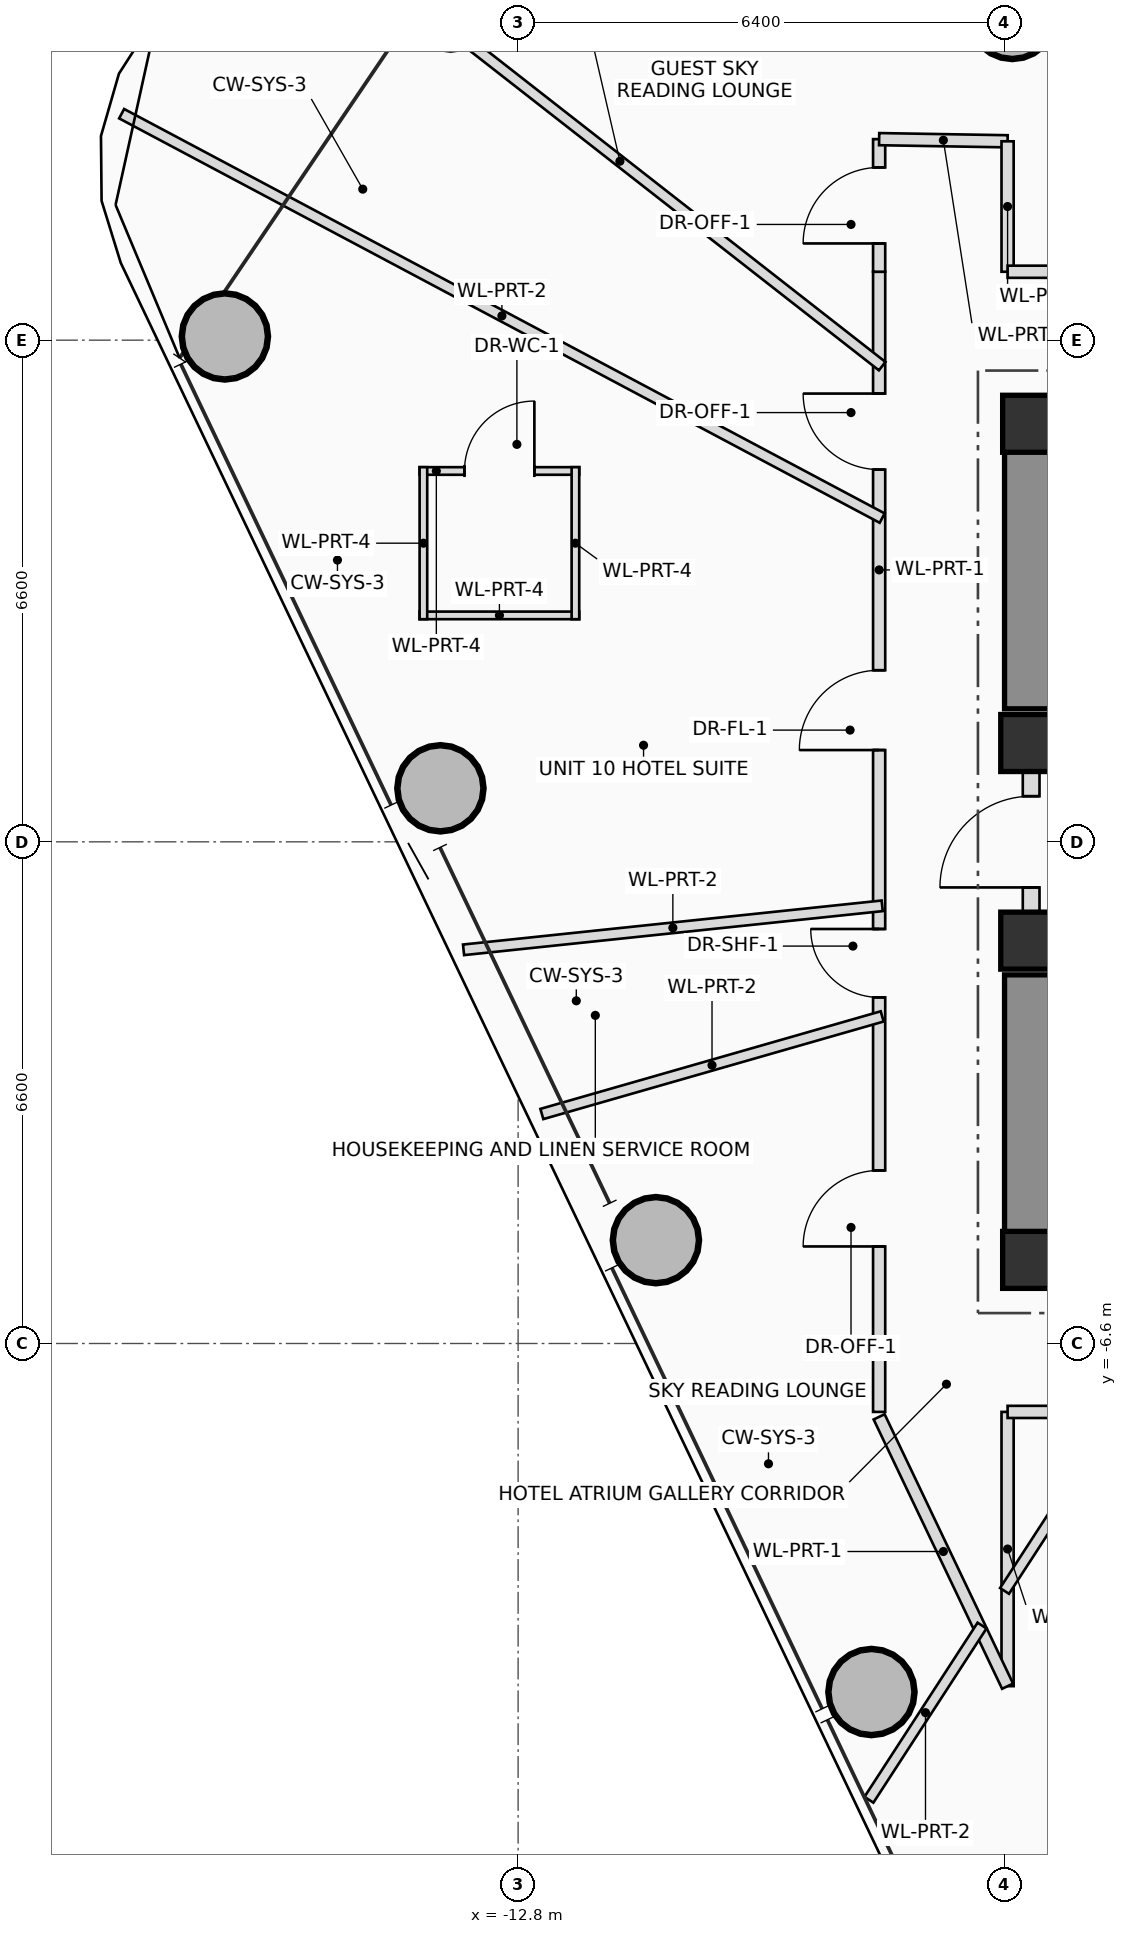
"""IFC4 building model, lengths in metres.
Left out: names, types, materials, properties, quantities, classifications, styles, units other than length and angle.
Written with IfcOpenShell. Run it as: python <this file> out.ifc"""

import sys

from ifc_helpers import new_model, si_unit, direction, frame, frame_2d, origin, origin_2d, place, context, subcontext, project, spatial, rectangle, hollow_circle, extrude, source, transform, mapped, element, fill, save


model = new_model("IFC4")
c1 = context("Model", 3, precision=1e-05, world=origin(), true_north=direction((0.0, 1.0)))
c2 = subcontext(c1, "Body", "Model", "MODEL_VIEW")
j1 = project(units=[si_unit("LENGTHUNIT", "METRE"), si_unit("PLANEANGLEUNIT", "RADIAN")], contexts=[c1])
p1 = place(None, origin())
s1 = spatial("IfcSite", under=j1, at=p1, CompositionType="ELEMENT")
p2 = place(p1, origin())
s2 = spatial("IfcBuilding", under=s1, at=p2, CompositionType="ELEMENT")
p3 = place(p2, frame((0.0, 0.0, 191.45)))
s3 = spatial("IfcBuildingStorey", under=s2, at=p3, CompositionType="ELEMENT", Elevation=191.45)
m1 = source(origin(), c2, "Body", "SweptSolid", [
    extrude(rectangle(XDim=0.75, YDim=0.75, at=origin_2d()), origin(), (0.0, 0.0, 1.0), 3.45),
])
for number, where, z_axis, x_axis in (
    (1, (-6.05, -5.5, 0.0), (0.0, 0.0, 1.0), (1.0, 0.0, 0.0)),
    (2, (-6.05, 5.5, 0.0), (0.0, 0.0, 1.0), (1.0, 0.0, 0.0)),
):
    element("IfcColumn", number, at=place(p3, frame(where, z_axis=z_axis, x_axis=x_axis)), inside=s3, PredefinedType="COLUMN", context=c2, shape_type="MappedRepresentation", body=[
        mapped(m1, transform((0.0, 0.0, 0.0), scale=1.0)),
    ])
p4 = place(p3, frame((-6.4, 5.525, 0.0), z_axis=(0.0, 0.0, 1.0), x_axis=(1.0, 0.0, 0.0)))
e3 = element("IfcWall", 3, at=p4, inside=s3, PredefinedType="SHEAR", context=c2, shape_type="SweptSolid", body=[
    extrude(rectangle(XDim=12.8, YDim=0.65, at=frame_2d((6.4, 0.0))), origin(), (0.0, 0.0, 1.0), 3.45),
])
p5 = place(p4, frame((8.6, 0.0, 0.0)))
e4 = element("IfcOpeningElement", 4, at=p5, cuts=e3, PredefinedType="OPENING", context=c2, shape_type="SweptSolid", body=[
    extrude(rectangle(XDim=1.2, YDim=2.2, at=frame_2d((0.6, 1.1))), frame((0.0, 0.335, 0.0), z_axis=(0.0, -1.0, 0.0), x_axis=(1.0, 0.0, 0.0)), (0.0, 0.0, 1.0), 0.67),
])
p6 = place(p3, frame((-6.4, -5.525, 0.0), z_axis=(0.0, 0.0, 1.0), x_axis=(1.0, 0.0, 0.0)))
e5 = element("IfcWall", 5, at=p6, inside=s3, PredefinedType="SHEAR", context=c2, shape_type="SweptSolid", body=[
    extrude(rectangle(XDim=12.8, YDim=0.65, at=frame_2d((6.4, 0.0))), origin(), (0.0, 0.0, 1.0), 3.45),
])
p7 = place(p6, frame((8.6, 0.0, 0.0)))
e6 = element("IfcOpeningElement", 6, at=p7, cuts=e5, PredefinedType="OPENING", context=c2, shape_type="SweptSolid", body=[
    extrude(rectangle(XDim=1.2, YDim=2.2, at=frame_2d((0.6, 1.1))), frame((0.0, 0.335, 0.0), z_axis=(0.0, -1.0, 0.0), x_axis=(1.0, 0.0, 0.0)), (0.0, 0.0, 1.0), 0.67),
])
for number, where, z_axis, x_axis in (
    (7, (-6.075, -5.2, 0.0), (0.0, 0.0, 1.0), (0.0, 1.0, 0.0)),
    (8, (-6.075, 1.75, 0.0), (0.0, 0.0, 1.0), (0.0, 1.0, 0.0)),
):
    element("IfcWall", number, at=place(p3, frame(where, z_axis=z_axis, x_axis=x_axis)), inside=s3, PredefinedType="SHEAR", context=c2, shape_type="SweptSolid", body=[
        extrude(rectangle(XDim=3.45, YDim=0.65, at=frame_2d((1.725, 0.0))), origin(), (0.0, 0.0, 1.0), 3.45),
    ])
for number, where, z_axis, x_axis in (
    (9, (-6.075, -1.3, 0.0), (0.0, 0.0, 1.0), (1.0, 0.0, 0.0)),
    (10, (-6.075, 1.3, 0.0), (0.0, 0.0, 1.0), (1.0, 0.0, 0.0)),
):
    element("IfcColumn", number, at=place(p3, frame(where, z_axis=z_axis, x_axis=x_axis)), inside=s3, PredefinedType="COLUMN", context=c2, shape_type="MappedRepresentation", body=[
        mapped(m1, transform((0.0, 0.0, 0.0), scale=1.0)),
    ])
m2 = source(origin(), c2, "Body", "SweptSolid", [
    extrude(hollow_circle(Radius=0.575, WallThickness=0.042, at=origin_2d()), origin(), (0.0, 0.0, 1.0), 3.45),
])
for number, where, z_axis, x_axis in (
    (11, (-6.298, 10.865, 0.0), (0.0, 0.0, 1.0), (1.0, 0.0, 0.0)),
    (12, (-16.658, 6.649, 0.0), (0.0, 0.0, 1.0), (1.0, 0.0, 0.0)),
    (13, (-13.823, 0.704, 0.0), (0.0, 0.0, 1.0), (1.0, 0.0, 0.0)),
    (14, (-10.987, -5.24, 0.0), (0.0, 0.0, 1.0), (1.0, 0.0, 0.0)),
    (15, (-8.151, -11.185, 0.0), (0.0, 0.0, 1.0), (1.0, 0.0, 0.0)),
):
    element("IfcColumn", number, at=place(p3, frame(where, z_axis=z_axis, x_axis=x_axis)), inside=s3, PredefinedType="COLUMN", context=c2, shape_type="MappedRepresentation", body=[
        mapped(m2, transform((0.0, 0.0, 0.0), scale=1.0)),
    ])
p8 = place(p3, frame((-6.05, -0.95, 0.0), z_axis=(0.0, 0.0, 1.0), x_axis=(0.0, 1.0, 0.0)))
e16 = element("IfcWall", 16, at=p8, inside=s3, PredefinedType="PLUMBINGWALL", context=c2, shape_type="SweptSolid", body=[
    extrude(rectangle(XDim=1.9, YDim=0.22, at=frame_2d((0.95, 0.0))), origin(), (0.0, 0.0, 1.0), 2.23),
])
p9 = place(p8, frame((0.35, 0.0, 0.0)))
e17 = element("IfcOpeningElement", 17, at=p9, cuts=e16, PredefinedType="OPENING", context=c2, shape_type="SweptSolid", body=[
    extrude(rectangle(XDim=1.2, YDim=2.2, at=frame_2d((0.6, 1.1))), frame((0.0, 0.12, 0.0), z_axis=(0.0, -1.0, 0.0), x_axis=(1.0, 0.0, 0.0)), (0.0, 0.0, 1.0), 0.24),
])
p10 = place(p3, frame((-14.096, 4.879, 0.0), z_axis=(0.0, 0.0, 1.0), x_axis=(1.0, 0.0, 0.0)))
e18 = element("IfcWall", 18, at=p10, inside=s3, PredefinedType="PARTITIONING", context=c2, shape_type="SweptSolid", body=[
    extrude(rectangle(XDim=2.1, YDim=0.1, at=frame_2d((1.05, 0.0))), origin(), (0.0, 0.0, 1.0), 2.905),
])
p11 = place(p10, frame((0.59, 0.0, 0.0)))
e19 = element("IfcOpeningElement", 19, at=p11, cuts=e18, PredefinedType="OPENING", context=c2, shape_type="SweptSolid", body=[
    extrude(rectangle(XDim=0.92, YDim=2.1, at=frame_2d((0.46, 1.05))), frame((0.0, 0.06, 0.0), z_axis=(0.0, -1.0, 0.0), x_axis=(1.0, 0.0, 0.0)), (0.0, 0.0, 1.0), 0.12),
])
p12 = place(p3, frame((-11.996, 2.979, 0.0), z_axis=(0.0, 0.0, 1.0), x_axis=(-1.0, 0.0, 0.0)))
e20 = element("IfcWall", 20, at=p12, inside=s3, PredefinedType="PARTITIONING", context=c2, shape_type="SweptSolid", body=[
    extrude(rectangle(XDim=2.1, YDim=0.1, at=frame_2d((1.05, 0.0))), origin(), (0.0, 0.0, 1.0), 2.905),
])
for number, where, z_axis, x_axis in (
    (21, (-12.046, 4.929, 0.0), (0.0, 0.0, 1.0), (0.0, -1.0, 0.0)),
    (22, (-14.046, 2.929, 0.0), (0.0, 0.0, 1.0), (0.0, 1.0, 0.0)),
):
    element("IfcWall", number, at=place(p3, frame(where, z_axis=z_axis, x_axis=x_axis)), inside=s3, PredefinedType="PARTITIONING", context=c2, shape_type="SweptSolid", body=[
        extrude(rectangle(XDim=2.0, YDim=0.1, at=frame_2d((1.0, 0.0))), origin(), (0.0, 0.0, 1.0), 3.25),
    ])
p13 = place(p3, frame((-6.36, -7.5, 0.0), z_axis=(0.0, 0.0, 1.0), x_axis=(0.0, -1.0, 0.0)))
e23 = element("IfcWall", 23, at=p13, inside=s3, PredefinedType="PARTITIONING", context=c2, shape_type="SweptSolid", body=[
    extrude(rectangle(XDim=3.608, YDim=0.16, at=frame_2d((1.804, 0.0))), origin(), (0.0, 0.0, 1.0), 3.25),
])
p14 = place(p3, frame((-6.36, -11.108, 0.0), z_axis=(0.0, 0.0, 1.0), x_axis=(-0.430493571255, 0.902593643401, 0.0)))
e24 = element("IfcWall", 24, at=p14, inside=s3, PredefinedType="PARTITIONING", context=c2, shape_type="SweptSolid", body=[
    extrude(rectangle(XDim=3.926, YDim=0.16, at=frame_2d((1.963, 0.0))), origin(), (0.0, 0.0, 1.0), 2.605),
])
p15 = place(p3, frame((-8.05, -7.5, 0.0), z_axis=(0.0, 0.0, 1.0), x_axis=(0.0, 1.0, 0.0)))
e25 = element("IfcWall", 25, at=p15, inside=s3, PredefinedType="PARTITIONING", context=c2, shape_type="SweptSolid", body=[
    extrude(rectangle(XDim=15.0, YDim=0.16, at=frame_2d((7.5, 0.0))), origin(), (0.0, 0.0, 1.0), 2.605),
])
p16 = place(p15, frame((2.177, 0.0, 0.0)))
e26 = element("IfcOpeningElement", 26, at=p16, cuts=e25, PredefinedType="OPENING", context=c2, shape_type="SweptSolid", body=[
    extrude(rectangle(XDim=1.0, YDim=2.25, at=frame_2d((0.5, 1.125))), frame((0.0, 0.09, 0.0), z_axis=(0.0, -1.0, 0.0), x_axis=(1.0, 0.0, 0.0)), (0.0, 0.0, 1.0), 0.18),
])
p17 = place(p15, frame((5.453, 0.0, 0.0)))
e27 = element("IfcOpeningElement", 27, at=p17, cuts=e25, PredefinedType="OPENING", context=c2, shape_type="SweptSolid", body=[
    extrude(rectangle(XDim=0.9, YDim=2.05, at=frame_2d((0.45, 1.025))), frame((0.0, 0.09, 0.0), z_axis=(0.0, -1.0, 0.0), x_axis=(1.0, 0.0, 0.0)), (0.0, 0.0, 1.0), 0.18),
])
p18 = place(p15, frame((8.707, 0.0, 0.0)))
e28 = element("IfcOpeningElement", 28, at=p18, cuts=e25, PredefinedType="OPENING", context=c2, shape_type="SweptSolid", body=[
    extrude(rectangle(XDim=1.05, YDim=2.2, at=frame_2d((0.525, 1.1))), frame((0.0, 0.09, 0.0), z_axis=(0.0, -1.0, 0.0), x_axis=(1.0, 0.0, 0.0)), (0.0, 0.0, 1.0), 0.18),
])
p19 = place(p15, frame((12.397, 0.0, 0.0)))
e29 = element("IfcOpeningElement", 29, at=p19, cuts=e25, PredefinedType="OPENING", context=c2, shape_type="SweptSolid", body=[
    extrude(rectangle(XDim=1.0, YDim=2.25, at=frame_2d((0.5, 1.125))), frame((0.0, 0.09, 0.0), z_axis=(0.0, -1.0, 0.0), x_axis=(1.0, 0.0, 0.0)), (0.0, 0.0, 1.0), 0.18),
])
p20 = place(p3, frame((-8.05, 7.5, 0.0), z_axis=(0.0, 0.0, 1.0), x_axis=(0.0, 1.0, 0.0)))
e30 = element("IfcWall", 30, at=p20, inside=s3, PredefinedType="PARTITIONING", context=c2, shape_type="SweptSolid", body=[
    extrude(rectangle(XDim=1.745, YDim=0.16, at=frame_2d((0.872, 0.0))), origin(), (0.0, 0.0, 1.0), 2.805),
])
p21 = place(p20, frame((0.372, 0.0, 0.0)))
e31 = element("IfcOpeningElement", 31, at=p21, cuts=e30, PredefinedType="OPENING", context=c2, shape_type="SweptSolid", body=[
    extrude(rectangle(XDim=1.0, YDim=2.25, at=frame_2d((0.5, 1.125))), frame((0.0, 0.09, 0.0), z_axis=(0.0, -1.0, 0.0), x_axis=(1.0, 0.0, 0.0)), (0.0, 0.0, 1.0), 0.18),
])
p22 = place(p3, frame((-8.05, 9.245, 0.0), z_axis=(0.0, 0.0, 1.0), x_axis=(0.999859611566, -0.016755809729, 0.0)))
e32 = element("IfcWall", 32, at=p22, inside=s3, PredefinedType="PARTITIONING", context=c2, shape_type="SweptSolid", body=[
    extrude(rectangle(XDim=1.69, YDim=0.16, at=frame_2d((0.845, 0.0))), origin(), (0.0, 0.0, 1.0), 2.905),
])
p23 = place(p3, frame((-6.36, 9.216, 0.0), z_axis=(0.0, 0.0, 1.0), x_axis=(0.0, -1.0, 0.0)))
e33 = element("IfcWall", 33, at=p23, inside=s3, PredefinedType="PARTITIONING", context=c2, shape_type="SweptSolid", body=[
    extrude(rectangle(XDim=1.716, YDim=0.16, at=frame_2d((0.858, 0.0))), origin(), (0.0, 0.0, 1.0), 2.605),
])
p24 = place(p3, frame((-6.36, 7.5, 0.0), z_axis=(0.0, 0.0, 1.0), x_axis=(1.0, 0.0, 0.0)))
e34 = element("IfcWall", 34, at=p24, inside=s3, PredefinedType="PARTITIONING", context=c2, shape_type="SweptSolid", body=[
    extrude(rectangle(XDim=11.61, YDim=0.16, at=frame_2d((5.805, 0.0))), origin(), (0.0, 0.0, 1.0), 2.605),
])
p25 = place(p24, frame((3.948, 0.0, 0.0)))
e35 = element("IfcOpeningElement", 35, at=p25, cuts=e34, PredefinedType="OPENING", context=c2, shape_type="SweptSolid", body=[
    extrude(rectangle(XDim=1.0, YDim=2.25, at=frame_2d((0.5, 1.125))), frame((0.0, 0.09, 0.0), z_axis=(0.0, -1.0, 0.0), x_axis=(1.0, 0.0, 0.0)), (0.0, 0.0, 1.0), 0.18),
])
p26 = place(p24, frame((8.993, 0.0, 0.0)))
e36 = element("IfcOpeningElement", 36, at=p26, cuts=e34, PredefinedType="OPENING", context=c2, shape_type="SweptSolid", body=[
    extrude(rectangle(XDim=1.0, YDim=2.25, at=frame_2d((0.5, 1.125))), frame((0.0, 0.09, 0.0), z_axis=(0.0, -1.0, 0.0), x_axis=(1.0, 0.0, 0.0)), (0.0, 0.0, 1.0), 0.18),
])
p27 = place(p3, frame((5.25, -7.5, 0.0), z_axis=(0.0, 0.0, 1.0), x_axis=(-1.0, 0.0, 0.0)))
e37 = element("IfcWall", 37, at=p27, inside=s3, PredefinedType="PARTITIONING", context=c2, shape_type="SweptSolid", body=[
    extrude(rectangle(XDim=11.61, YDim=0.16, at=frame_2d((5.805, 0.0))), origin(), (0.0, 0.0, 1.0), 2.605),
])
p28 = place(p27, frame((1.525, 0.0, 0.0)))
e38 = element("IfcOpeningElement", 38, at=p28, cuts=e37, PredefinedType="OPENING", context=c2, shape_type="SweptSolid", body=[
    extrude(rectangle(XDim=1.05, YDim=2.2, at=frame_2d((0.525, 1.1))), frame((0.0, 0.09, 0.0), z_axis=(0.0, -1.0, 0.0), x_axis=(1.0, 0.0, 0.0)), (0.0, 0.0, 1.0), 0.18),
])
p29 = place(p27, frame((4.281, 0.0, 0.0)))
e39 = element("IfcOpeningElement", 39, at=p29, cuts=e37, PredefinedType="OPENING", context=c2, shape_type="SweptSolid", body=[
    extrude(rectangle(XDim=1.0, YDim=2.25, at=frame_2d((0.5, 1.125))), frame((0.0, 0.09, 0.0), z_axis=(0.0, -1.0, 0.0), x_axis=(1.0, 0.0, 0.0)), (0.0, 0.0, 1.0), 0.18),
])
p30 = place(p27, frame((7.409, 0.0, 0.0)))
e40 = element("IfcOpeningElement", 40, at=p30, cuts=e37, PredefinedType="OPENING", context=c2, shape_type="SweptSolid", body=[
    extrude(rectangle(XDim=1.0, YDim=2.25, at=frame_2d((0.5, 1.125))), frame((0.0, 0.09, 0.0), z_axis=(0.0, -1.0, 0.0), x_axis=(1.0, 0.0, 0.0)), (0.0, 0.0, 1.0), 0.18),
])
p31 = place(p3, frame((-8.01, 6.258, 0.0), z_axis=(0.0, 0.0, 1.0), x_axis=(-0.788015921071, 0.615654861216, 0.0)))
e41 = element("IfcWall", 41, at=p31, inside=s3, PredefinedType="PARTITIONING", context=c2, shape_type="SweptSolid", body=[
    extrude(rectangle(XDim=8.758, YDim=0.14, at=frame_2d((4.379, 0.0))), origin(), (0.0, 0.0, 1.0), 2.805),
])
p32 = place(p3, frame((-8.01, 4.259, 0.0), z_axis=(0.0, 0.0, 1.0), x_axis=(-0.882949150857, 0.469468632606, 0.0)))
e42 = element("IfcWall", 42, at=p32, inside=s3, PredefinedType="PARTITIONING", context=c2, shape_type="SweptSolid", body=[
    extrude(rectangle(XDim=11.333, YDim=0.14, at=frame_2d((5.667, 0.0))), origin(), (0.0, 0.0, 1.0), 2.605),
])
p33 = place(p3, frame((-8.01, -0.842, 0.0), z_axis=(0.0, 0.0, 1.0), x_axis=(-0.994518006468, -0.104565457063, 0.0)))
e43 = element("IfcWall", 43, at=p33, inside=s3, PredefinedType="PARTITIONING", context=c2, shape_type="SweptSolid", body=[
    extrude(rectangle(XDim=5.538, YDim=0.14, at=frame_2d((2.769, 0.0))), origin(), (0.0, 0.0, 1.0), 2.765),
])
p34 = place(p3, frame((-8.01, -2.297, 0.0), z_axis=(0.0, 0.0, 1.0), x_axis=(-0.961260451266, -0.275641696467, 0.0)))
e44 = element("IfcWall", 44, at=p34, inside=s3, PredefinedType="PARTITIONING", context=c2, shape_type="SweptSolid", body=[
    extrude(rectangle(XDim=4.658, YDim=0.14, at=frame_2d((2.329, 0.0))), origin(), (0.0, 0.0, 1.0), 2.765),
])
p35 = place(p3, frame((-4.844, -7.46, 0.0), z_axis=(0.0, 0.0, 1.0), x_axis=(-0.544657766351, -0.838658403376, 0.0)))
e45 = element("IfcWall", 45, at=p35, inside=s3, PredefinedType="PARTITIONING", context=c2, shape_type="SweptSolid", body=[
    extrude(rectangle(XDim=2.856, YDim=0.14, at=frame_2d((1.428, 0.0))), origin(), (0.0, 0.0, 1.0), 2.605),
])
p36 = place(p3, frame((-6.696, -10.311, 0.0), z_axis=(0.0, 0.0, 1.0), x_axis=(-0.54459891399, -0.838696621479, 0.0)))
e46 = element("IfcWall", 46, at=p36, inside=s3, PredefinedType="PARTITIONING", context=c2, shape_type="SweptSolid", body=[
    extrude(rectangle(XDim=2.733, YDim=0.14, at=frame_2d((1.366, 0.0))), origin(), (0.0, 0.0, 1.0), 2.765),
])
p37 = place(p9, origin())
e47 = element("IfcDoor", 47, at=p37, inside=s3, OperationType="SINGLE_SWING_LEFT", PredefinedType="DOOR", context=c2, shape_type="SweptSolid", body=[
    extrude(rectangle(XDim=1.2, YDim=2.2, at=frame_2d((0.6, 1.1))), frame((0.0, 0.025, 0.0), z_axis=(0.0, -1.0, 0.0), x_axis=(1.0, 0.0, 0.0)), (0.0, 0.0, 1.0), 0.05),
])
fill(e17, e47)
p38 = place(p11, origin())
e48 = element("IfcDoor", 48, at=p38, inside=s3, OperationType="SINGLE_SWING_RIGHT", PredefinedType="DOOR", context=c2, shape_type="SweptSolid", body=[
    extrude(rectangle(XDim=0.92, YDim=2.1, at=frame_2d((0.46, 1.05))), frame((0.0, 0.025, 0.0), z_axis=(0.0, -1.0, 0.0), x_axis=(1.0, 0.0, 0.0)), (0.0, 0.0, 1.0), 0.05),
])
fill(e19, e48)
p39 = place(p16, origin())
e49 = element("IfcDoor", 49, at=p39, inside=s3, OperationType="SINGLE_SWING_LEFT", PredefinedType="DOOR", context=c2, shape_type="SweptSolid", body=[
    extrude(rectangle(XDim=1.0, YDim=2.25, at=frame_2d((0.5, 1.125))), frame((0.0, 0.025, 0.0), z_axis=(0.0, -1.0, 0.0), x_axis=(1.0, 0.0, 0.0)), (0.0, 0.0, 1.0), 0.05),
])
fill(e26, e49)
p40 = place(p17, origin())
e50 = element("IfcDoor", 50, at=p40, inside=s3, OperationType="SINGLE_SWING_RIGHT", PredefinedType="DOOR", context=c2, shape_type="SweptSolid", body=[
    extrude(rectangle(XDim=0.9, YDim=2.05, at=frame_2d((0.45, 1.025))), frame((0.0, 0.025, 0.0), z_axis=(0.0, -1.0, 0.0), x_axis=(1.0, 0.0, 0.0)), (0.0, 0.0, 1.0), 0.05),
])
fill(e27, e50)
p41 = place(p18, origin())
e51 = element("IfcDoor", 51, at=p41, inside=s3, OperationType="SINGLE_SWING_LEFT", PredefinedType="DOOR", context=c2, shape_type="SweptSolid", body=[
    extrude(rectangle(XDim=1.05, YDim=2.2, at=frame_2d((0.525, 1.1))), frame((0.0, 0.025, 0.0), z_axis=(0.0, -1.0, 0.0), x_axis=(1.0, 0.0, 0.0)), (0.0, 0.0, 1.0), 0.05),
])
fill(e28, e51)
p42 = place(p19, origin())
e52 = element("IfcDoor", 52, at=p42, inside=s3, OperationType="SINGLE_SWING_RIGHT", PredefinedType="DOOR", context=c2, shape_type="SweptSolid", body=[
    extrude(rectangle(XDim=1.0, YDim=2.25, at=frame_2d((0.5, 1.125))), frame((0.0, 0.025, 0.0), z_axis=(0.0, -1.0, 0.0), x_axis=(1.0, 0.0, 0.0)), (0.0, 0.0, 1.0), 0.05),
])
fill(e29, e52)
p43 = place(p21, origin())
e53 = element("IfcDoor", 53, at=p43, inside=s3, OperationType="SINGLE_SWING_LEFT", PredefinedType="DOOR", context=c2, shape_type="SweptSolid", body=[
    extrude(rectangle(XDim=1.0, YDim=2.25, at=frame_2d((0.5, 1.125))), frame((0.0, 0.025, 0.0), z_axis=(0.0, -1.0, 0.0), x_axis=(1.0, 0.0, 0.0)), (0.0, 0.0, 1.0), 0.05),
])
fill(e31, e53)
save(model, sys.argv[1])
